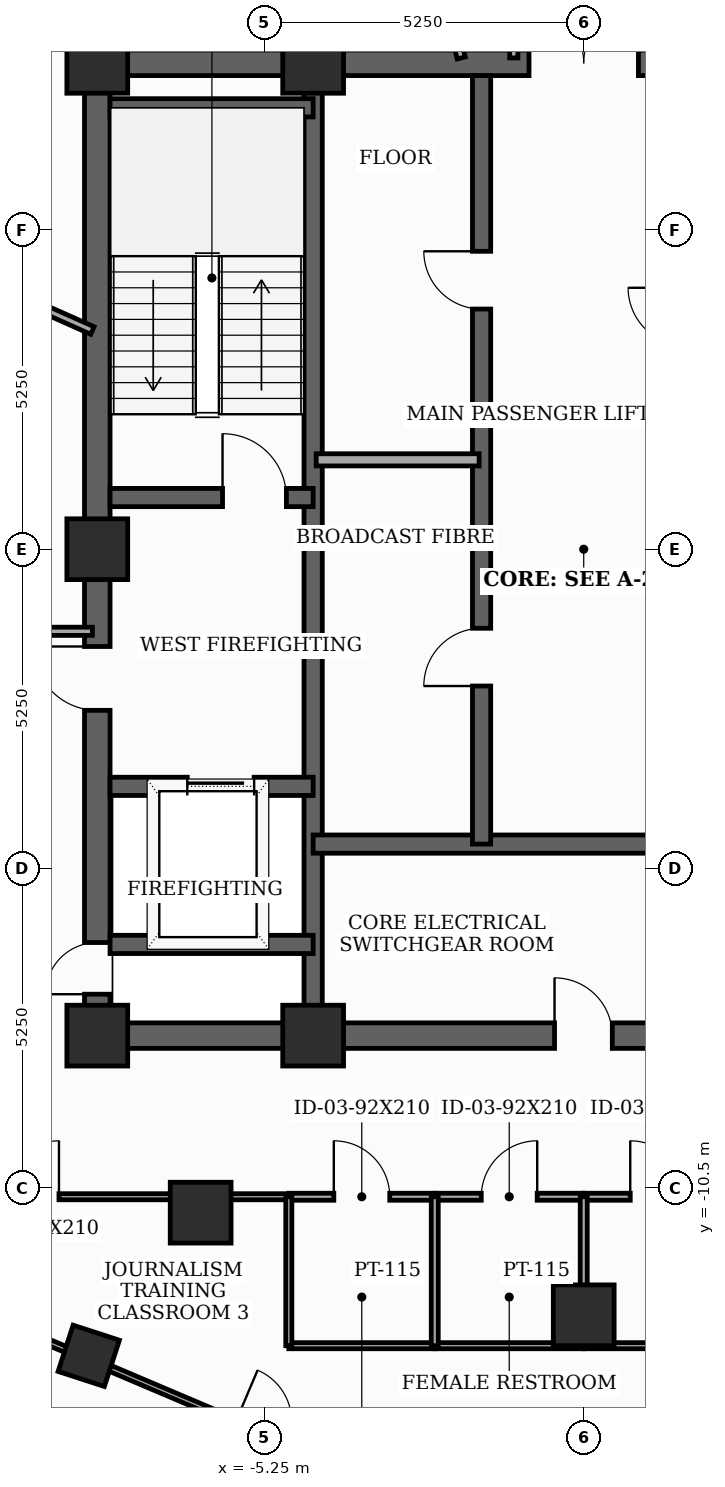
"""IFC4 building model, lengths in metres.
Left out: names, types, materials, properties, quantities, classifications, styles, units other than length and angle.
Written with IfcOpenShell. Run it as: python <this file> out.ifc"""

import sys

from ifc_helpers import new_model, si_unit, direction, frame, frame_2d, origin, origin_2d, place, context, subcontext, project, spatial, rectangle, extrude, element, fill, save


model = new_model("IFC4")
c1 = context("Model", 3, precision=1e-05, world=origin(), true_north=direction((0.0, 1.0)))
c2 = subcontext(c1, "Body", "Model", "MODEL_VIEW")
j1 = project(units=[si_unit("LENGTHUNIT", "METRE"), si_unit("PLANEANGLEUNIT", "RADIAN")], contexts=[c1])
p1 = place(None, origin())
s1 = spatial("IfcSite", under=j1, at=p1, CompositionType="ELEMENT")
p2 = place(p1, origin())
s2 = spatial("IfcBuilding", under=s1, at=p2, CompositionType="ELEMENT")
p3 = place(p2, frame((0.0, 0.0, 286.9)))
s3 = spatial("IfcBuildingStorey", under=s2, at=p3, CompositionType="ELEMENT", Elevation=286.9)
for number, where, z_axis, x_axis in (
    (1, (-8.0, -8.0, 0.0), (0.0, 0.0, 1.0), (1.0, 0.0, 0.0)),
    (2, (-4.45, -8.0, 0.0), (0.0, 0.0, 1.0), (1.0, 0.0, 0.0)),
    (3, (-4.45, 8.0, 0.0), (0.0, 0.0, 1.0), (1.0, 0.0, 0.0)),
    (4, (-8.0, 8.0, 0.0), (0.0, 0.0, 1.0), (1.0, 0.0, 0.0)),
    (5, (-8.0, 0.0, 0.0), (0.0, 0.0, 1.0), (1.0, 0.0, 0.0)),
    (6, (-6.3, -10.912, 0.0), (0.0, 0.0, 1.0), (1.0, 0.0, 0.0)),
    (7, (0.0, -12.6, 0.0), (0.0, 0.0, 1.0), (1.0, 0.0, 0.0)),
):
    element("IfcColumn", number, at=place(p3, frame(where, z_axis=z_axis, x_axis=x_axis)), inside=s3, PredefinedType="COLUMN", context=c2, shape_type="SweptSolid", body=[
        extrude(rectangle(XDim=1.0, YDim=1.0, at=origin_2d()), origin(), (0.0, 0.0, 1.0), 3.7),
    ])
p4 = place(p3, frame((-8.14, -13.266, 0.0), z_axis=(0.0, 0.0, 1.0), x_axis=(0.309016994375, 0.951056516295, 0.0)))
e8 = element("IfcColumn", 8, at=p4, inside=s3, PredefinedType="COLUMN", context=c2, shape_type="SweptSolid", body=[
    extrude(rectangle(XDim=0.8, YDim=0.8, at=origin_2d()), origin(), (0.0, 0.0, 1.0), 3.7),
])
p5 = place(p3, frame((-8.0, -8.0, 0.0), z_axis=(0.0, 0.0, 1.0), x_axis=(0.0, 1.0, 0.0)))
e9 = element("IfcWall", 9, at=p5, inside=s3, PredefinedType="SHEAR", context=c2, shape_type="SweptSolid", body=[
    extrude(rectangle(XDim=16.0, YDim=0.42, at=frame_2d((8.0, 0.0))), origin(), (0.0, 0.0, 1.0), 3.5),
])
p6 = place(p5, frame((0.681, 0.0, 0.0)))
e10 = element("IfcOpeningElement", 10, at=p6, cuts=e9, PredefinedType="OPENING", context=c2, shape_type="SweptSolid", body=[
    extrude(rectangle(XDim=0.85, YDim=2.02, at=frame_2d((0.425, 1.01))), frame((0.0, 0.22, 0.0), z_axis=(0.0, -1.0, 0.0), x_axis=(1.0, 0.0, 0.0)), (0.0, 0.0, 1.0), 0.44),
])
p7 = place(p5, frame((5.35, 0.0, 0.0)))
e11 = element("IfcOpeningElement", 11, at=p7, cuts=e9, PredefinedType="OPENING", context=c2, shape_type="SweptSolid", body=[
    extrude(rectangle(XDim=1.05, YDim=2.15, at=frame_2d((0.525, 1.075))), frame((0.0, 0.22, 0.0), z_axis=(0.0, -1.0, 0.0), x_axis=(1.0, 0.0, 0.0)), (0.0, 0.0, 1.0), 0.44),
])
p8 = place(p3, frame((-8.0, -8.0, 0.0), z_axis=(0.0, 0.0, 1.0), x_axis=(1.0, 0.0, 0.0)))
e12 = element("IfcWall", 12, at=p8, inside=s3, PredefinedType="SHEAR", context=c2, shape_type="SweptSolid", body=[
    extrude(rectangle(XDim=16.0, YDim=0.42, at=frame_2d((8.0, 0.0))), origin(), (0.0, 0.0, 1.0), 3.5),
])
p9 = place(p8, frame((7.52, 0.0, 0.0)))
e13 = element("IfcOpeningElement", 13, at=p9, cuts=e12, PredefinedType="OPENING", context=c2, shape_type="SweptSolid", body=[
    extrude(rectangle(XDim=0.95, YDim=2.1, at=frame_2d((0.475, 1.05))), frame((0.0, 0.22, 0.0), z_axis=(0.0, -1.0, 0.0), x_axis=(1.0, 0.0, 0.0)), (0.0, 0.0, 1.0), 0.44),
])
p10 = place(p3, frame((-8.0, 8.0, 0.0), z_axis=(0.0, 0.0, 1.0), x_axis=(1.0, 0.0, 0.0)))
e14 = element("IfcWall", 14, at=p10, inside=s3, PredefinedType="SHEAR", context=c2, shape_type="SweptSolid", body=[
    extrude(rectangle(XDim=16.0, YDim=0.42, at=frame_2d((8.0, 0.0))), origin(), (0.0, 0.0, 1.0), 3.5),
])
p11 = place(p10, frame((7.1, 0.0, 0.0)))
e15 = element("IfcOpeningElement", 15, at=p11, cuts=e14, PredefinedType="OPENING", context=c2, shape_type="SweptSolid", body=[
    extrude(rectangle(XDim=1.8, YDim=2.15, at=frame_2d((0.9, 1.075))), frame((0.0, 0.22, 0.0), z_axis=(0.0, -1.0, 0.0), x_axis=(1.0, 0.0, 0.0)), (0.0, 0.0, 1.0), 0.44),
])
p12 = place(p3, frame((-4.45, -7.79, 0.0), z_axis=(0.0, 0.0, 1.0), x_axis=(0.0, 1.0, 0.0)))
e16 = element("IfcWall", 16, at=p12, inside=s3, PredefinedType="SHEAR", context=c2, shape_type="SweptSolid", body=[
    extrude(rectangle(XDim=15.58, YDim=0.3, at=frame_2d((7.79, 0.0))), origin(), (0.0, 0.0, 1.0), 3.5),
])
p13 = place(p3, frame((-7.79, 0.85, 0.0), z_axis=(0.0, 0.0, 1.0), x_axis=(1.0, 0.0, 0.0)))
e17 = element("IfcWall", 17, at=p13, inside=s3, PredefinedType="SHEAR", context=c2, shape_type="SweptSolid", body=[
    extrude(rectangle(XDim=3.34, YDim=0.3, at=frame_2d((1.67, 0.0))), origin(), (0.0, 0.0, 1.0), 3.5),
])
p14 = place(p13, frame((1.85, 0.0, 0.0)))
e18 = element("IfcOpeningElement", 18, at=p14, cuts=e17, PredefinedType="OPENING", context=c2, shape_type="SweptSolid", body=[
    extrude(rectangle(XDim=1.05, YDim=2.15, at=frame_2d((0.525, 1.075))), frame((0.0, 0.16, 0.0), z_axis=(0.0, -1.0, 0.0), x_axis=(1.0, 0.0, 0.0)), (0.0, 0.0, 1.0), 0.32),
])
p15 = place(p3, frame((-7.79, 7.26, 0.0), z_axis=(0.0, 0.0, 1.0), x_axis=(1.0, 0.0, 0.0)))
e19 = element("IfcWall", 19, at=p15, inside=s3, PredefinedType="SHEAR", context=c2, shape_type="SweptSolid", body=[
    extrude(rectangle(XDim=3.34, YDim=0.3, at=frame_2d((1.67, 0.0))), origin(), (0.0, 0.0, 1.0), 3.5),
])
p16 = place(p3, frame((-7.79, -3.9, 0.0), z_axis=(0.0, 0.0, 1.0), x_axis=(1.0, 0.0, 0.0)))
e20 = element("IfcWall", 20, at=p16, inside=s3, PredefinedType="SHEAR", context=c2, shape_type="SweptSolid", body=[
    extrude(rectangle(XDim=3.34, YDim=0.3, at=frame_2d((1.67, 0.0))), origin(), (0.0, 0.0, 1.0), 3.5),
])
p17 = place(p16, frame((1.27, 0.0, 0.0)))
e21 = element("IfcOpeningElement", 21, at=p17, cuts=e20, PredefinedType="OPENING", context=c2, shape_type="SweptSolid", body=[
    extrude(rectangle(XDim=1.1, YDim=2.1, at=frame_2d((0.55, 1.05))), frame((0.0, 0.16, 0.0), z_axis=(0.0, -1.0, 0.0), x_axis=(1.0, 0.0, 0.0)), (0.0, 0.0, 1.0), 0.32),
])
p18 = place(p3, frame((-7.79, -6.5, 0.0), z_axis=(0.0, 0.0, 1.0), x_axis=(1.0, 0.0, 0.0)))
e22 = element("IfcWall", 22, at=p18, inside=s3, PredefinedType="SHEAR", context=c2, shape_type="SweptSolid", body=[
    extrude(rectangle(XDim=3.34, YDim=0.3, at=frame_2d((1.67, 0.0))), origin(), (0.0, 0.0, 1.0), 3.5),
])
p19 = place(p3, frame((-4.45, -4.85, 0.0), z_axis=(0.0, 0.0, 1.0), x_axis=(1.0, 0.0, 0.0)))
e23 = element("IfcWall", 23, at=p19, inside=s3, PredefinedType="SHEAR", context=c2, shape_type="SweptSolid", body=[
    extrude(rectangle(XDim=8.9, YDim=0.3, at=frame_2d((4.45, 0.0))), origin(), (0.0, 0.0, 1.0), 3.5),
])
p20 = place(p3, frame((-1.68, -4.85, 0.0), z_axis=(0.0, 0.0, 1.0), x_axis=(0.0, 1.0, 0.0)))
e24 = element("IfcWall", 24, at=p20, inside=s3, PredefinedType="SHEAR", context=c2, shape_type="SweptSolid", body=[
    extrude(rectangle(XDim=12.64, YDim=0.3, at=frame_2d((6.32, 0.0))), origin(), (0.0, 0.0, 1.0), 3.5),
])
p21 = place(p20, frame((2.6, 0.0, 0.0)))
e25 = element("IfcOpeningElement", 25, at=p21, cuts=e24, PredefinedType="OPENING", context=c2, shape_type="SweptSolid", body=[
    extrude(rectangle(XDim=0.95, YDim=2.1, at=frame_2d((0.475, 1.05))), frame((0.0, 0.16, 0.0), z_axis=(0.0, -1.0, 0.0), x_axis=(1.0, 0.0, 0.0)), (0.0, 0.0, 1.0), 0.32),
])
p22 = place(p20, frame((8.8, 0.0, 0.0)))
e26 = element("IfcOpeningElement", 26, at=p22, cuts=e24, PredefinedType="OPENING", context=c2, shape_type="SweptSolid", body=[
    extrude(rectangle(XDim=0.95, YDim=2.1, at=frame_2d((0.475, 1.05))), frame((0.0, 0.16, 0.0), z_axis=(0.0, -1.0, 0.0), x_axis=(1.0, 0.0, 0.0)), (0.0, 0.0, 1.0), 0.32),
])
p23 = place(p3, frame((-4.4, 1.47, 0.0), z_axis=(0.0, 0.0, 1.0), x_axis=(1.0, 0.0, 0.0)))
e27 = element("IfcWall", 27, at=p23, inside=s3, PredefinedType="SOLIDWALL", context=c2, shape_type="SweptSolid", body=[
    extrude(rectangle(XDim=2.68, YDim=0.2, at=frame_2d((1.34, 0.0))), origin(), (0.0, 0.0, 1.0), 3.5),
])
p24 = place(p3, frame((-8.08, -1.35, 0.0), z_axis=(0.0, 0.0, 1.0), x_axis=(-1.0, 0.0, 0.0)))
e28 = element("IfcWall", 28, at=p24, inside=s3, PredefinedType="PARTITIONING", context=c2, shape_type="SweptSolid", body=[
    extrude(rectangle(XDim=2.57, YDim=0.135, at=frame_2d((1.285, 0.0))), origin(), (0.0, 0.0, 1.0), 2.885),
])
p25 = place(p3, frame((-10.15, -10.65, 0.0), z_axis=(0.0, 0.0, 1.0), x_axis=(1.0, 0.0, 0.0)))
e29 = element("IfcWall", 29, at=p25, inside=s3, PredefinedType="MOVABLE", context=c2, shape_type="SweptSolid", body=[
    extrude(rectangle(XDim=5.3, YDim=0.1, at=frame_2d((2.65, 0.0))), origin(), (0.0, 0.0, 1.0), 2.885),
])
p26 = place(p25, frame((0.6, 0.0, 0.0)))
e30 = element("IfcOpeningElement", 30, at=p26, cuts=e29, PredefinedType="OPENING", context=c2, shape_type="SweptSolid", body=[
    extrude(rectangle(XDim=0.92, YDim=2.1, at=frame_2d((0.46, 1.05))), frame((0.0, 0.06, 0.0), z_axis=(0.0, -1.0, 0.0), x_axis=(1.0, 0.0, 0.0)), (0.0, 0.0, 1.0), 0.12),
])
p27 = place(p3, frame((-4.85, -10.65, 0.0), z_axis=(0.0, 0.0, 1.0), x_axis=(1.0, 0.0, 0.0)))
e31 = element("IfcWall", 31, at=p27, inside=s3, PredefinedType="PARTITIONING", context=c2, shape_type="SweptSolid", body=[
    extrude(rectangle(XDim=2.4, YDim=0.115, at=frame_2d((1.2, 0.0))), origin(), (0.0, 0.0, 1.0), 3.5),
])
p28 = place(p27, frame((0.74, 0.0, 0.0)))
e32 = element("IfcOpeningElement", 32, at=p28, cuts=e31, PredefinedType="OPENING", context=c2, shape_type="SweptSolid", body=[
    extrude(rectangle(XDim=0.92, YDim=2.1, at=frame_2d((0.46, 1.05))), frame((0.0, 0.067, 0.0), z_axis=(0.0, -1.0, 0.0), x_axis=(1.0, 0.0, 0.0)), (0.0, 0.0, 1.0), 0.135),
])
p29 = place(p3, frame((-2.45, -10.65, 0.0), z_axis=(0.0, 0.0, 1.0), x_axis=(1.0, 0.0, 0.0)))
e33 = element("IfcWall", 33, at=p29, inside=s3, PredefinedType="PARTITIONING", context=c2, shape_type="SweptSolid", body=[
    extrude(rectangle(XDim=2.45, YDim=0.115, at=frame_2d((1.225, 0.0))), origin(), (0.0, 0.0, 1.0), 2.885),
])
p30 = place(p29, frame((0.765, 0.0, 0.0)))
e34 = element("IfcOpeningElement", 34, at=p30, cuts=e33, PredefinedType="OPENING", context=c2, shape_type="SweptSolid", body=[
    extrude(rectangle(XDim=0.92, YDim=2.1, at=frame_2d((0.46, 1.05))), frame((0.0, 0.067, 0.0), z_axis=(0.0, -1.0, 0.0), x_axis=(1.0, 0.0, 0.0)), (0.0, 0.0, 1.0), 0.135),
])
p31 = place(p3, frame((0.0, -10.65, 0.0), z_axis=(0.0, 0.0, 1.0), x_axis=(1.0, 0.0, 0.0)))
e35 = element("IfcWall", 35, at=p31, inside=s3, PredefinedType="PARTITIONING", context=c2, shape_type="SweptSolid", body=[
    extrude(rectangle(XDim=2.45, YDim=0.115, at=frame_2d((1.225, 0.0))), origin(), (0.0, 0.0, 1.0), 3.5),
])
p32 = place(p31, frame((0.765, 0.0, 0.0)))
e36 = element("IfcOpeningElement", 36, at=p32, cuts=e35, PredefinedType="OPENING", context=c2, shape_type="SweptSolid", body=[
    extrude(rectangle(XDim=0.92, YDim=2.1, at=frame_2d((0.46, 1.05))), frame((0.0, 0.067, 0.0), z_axis=(0.0, -1.0, 0.0), x_axis=(1.0, 0.0, 0.0)), (0.0, 0.0, 1.0), 0.135),
])
p33 = place(p3, frame((-1.15, 10.65, 0.0), z_axis=(0.0, 0.0, 1.0), x_axis=(0.0, -1.0, 0.0)))
e37 = element("IfcWall", 37, at=p33, inside=s3, PredefinedType="PARTITIONING", context=c2, shape_type="SweptSolid", body=[
    extrude(rectangle(XDim=2.57, YDim=0.135, at=frame_2d((1.285, 0.0))), origin(), (0.0, 0.0, 1.0), 2.885),
])
p34 = place(p3, frame((-8.08, 3.597, 0.0), z_axis=(0.0, 0.0, 1.0), x_axis=(-0.913542590258, 0.406743083266, 0.0)))
e38 = element("IfcWall", 38, at=p34, inside=s3, PredefinedType="PARTITIONING", context=c2, shape_type="SweptSolid", body=[
    extrude(rectangle(XDim=18.505, YDim=0.135, at=frame_2d((9.252, 0.0))), origin(), (0.0, 0.0, 1.0), 2.885),
])
p35 = place(p34, frame((8.792, 0.0, 0.0)))
e39 = element("IfcOpeningElement", 39, at=p35, cuts=e38, PredefinedType="OPENING", context=c2, shape_type="SweptSolid", body=[
    extrude(rectangle(XDim=0.92, YDim=2.1, at=frame_2d((0.46, 1.05))), frame((0.0, 0.077, 0.0), z_axis=(0.0, -1.0, 0.0), x_axis=(1.0, 0.0, 0.0)), (0.0, 0.0, 1.0), 0.155),
])
p36 = place(p3, frame((-2.45, -13.1, 0.0), z_axis=(0.0, 0.0, 1.0), x_axis=(-1.0, 0.0, 0.0)))
e40 = element("IfcWall", 40, at=p36, inside=s3, PredefinedType="MOVABLE", context=c2, shape_type="SweptSolid", body=[
    extrude(rectangle(XDim=2.4, YDim=0.1, at=frame_2d((1.2, 0.0))), origin(), (0.0, 0.0, 1.0), 3.5),
])
p37 = place(p3, frame((-4.85, -13.1, 0.0), z_axis=(0.0, 0.0, 1.0), x_axis=(0.0, 1.0, 0.0)))
e41 = element("IfcWall", 41, at=p37, inside=s3, PredefinedType="MOVABLE", context=c2, shape_type="SweptSolid", body=[
    extrude(rectangle(XDim=2.45, YDim=0.1, at=frame_2d((1.225, 0.0))), origin(), (0.0, 0.0, 1.0), 2.885),
])
p38 = place(p3, frame((0.0, -13.1, 0.0), z_axis=(0.0, 0.0, 1.0), x_axis=(-1.0, 0.0, 0.0)))
e42 = element("IfcWall", 42, at=p38, inside=s3, PredefinedType="MOVABLE", context=c2, shape_type="SweptSolid", body=[
    extrude(rectangle(XDim=2.45, YDim=0.1, at=frame_2d((1.225, 0.0))), origin(), (0.0, 0.0, 1.0), 3.035),
])
p39 = place(p3, frame((-9.1, -12.916, 0.0), z_axis=(0.0, 0.0, 1.0), x_axis=(0.920506675175, -0.390726836752, 0.0)))
e43 = element("IfcWall", 43, at=p39, inside=s3, PredefinedType="MOVABLE", context=c2, shape_type="SweptSolid", body=[
    extrude(rectangle(XDim=6.659, YDim=0.1, at=frame_2d((3.33, 0.0))), origin(), (0.0, 0.0, 1.0), 3.035),
])
p40 = place(p39, frame((3.669, 0.0, 0.0)))
e44 = element("IfcOpeningElement", 44, at=p40, cuts=e43, PredefinedType="OPENING", context=c2, shape_type="SweptSolid", body=[
    extrude(rectangle(XDim=0.92, YDim=2.1, at=frame_2d((0.46, 1.05))), frame((0.0, 0.06, 0.0), z_axis=(0.0, -1.0, 0.0), x_axis=(1.0, 0.0, 0.0)), (0.0, 0.0, 1.0), 0.12),
])
p41 = place(p3, frame((2.45, -13.1, 0.0), z_axis=(0.0, 0.0, 1.0), x_axis=(-1.0, 0.0, 0.0)))
e45 = element("IfcWall", 45, at=p41, inside=s3, PredefinedType="MOVABLE", context=c2, shape_type="SweptSolid", body=[
    extrude(rectangle(XDim=2.45, YDim=0.1, at=frame_2d((1.225, 0.0))), origin(), (0.0, 0.0, 1.0), 3.035),
])
for number, where, z_axis, x_axis in (
    (46, (-2.45, -13.1, 0.0), (0.0, 0.0, 1.0), (0.0, 1.0, 0.0)),
    (47, (0.0, -13.1, 0.0), (0.0, 0.0, 1.0), (0.0, 1.0, 0.0)),
):
    element("IfcWall", number, at=place(p3, frame(where, z_axis=z_axis, x_axis=x_axis)), inside=s3, PredefinedType="PARTITIONING", context=c2, shape_type="SweptSolid", body=[
        extrude(rectangle(XDim=2.45, YDim=0.115, at=frame_2d((1.225, 0.0))), origin(), (0.0, 0.0, 1.0), 2.885),
    ])
p42 = place(p3, frame((-3.803, 15.255, 0.0), z_axis=(0.0, 0.0, 1.0), x_axis=(0.241851911951, -0.970313172479, 0.0)))
e48 = element("IfcWall", 48, at=p42, inside=s3, PredefinedType="PARTITIONING", context=c2, shape_type="SweptSolid", body=[
    extrude(rectangle(XDim=7.394, YDim=0.135, at=frame_2d((3.697, 0.0))), origin(), (0.0, 0.0, 1.0), 2.885),
])
p43 = place(p6, origin())
e49 = element("IfcDoor", 49, at=p43, inside=s3, OperationType="SINGLE_SWING_LEFT", PredefinedType="TRAPDOOR", context=c2, shape_type="SweptSolid", body=[
    extrude(rectangle(XDim=0.85, YDim=2.02, at=frame_2d((0.425, 1.01))), frame((0.0, 0.025, 0.0), z_axis=(0.0, -1.0, 0.0), x_axis=(1.0, 0.0, 0.0)), (0.0, 0.0, 1.0), 0.05),
])
fill(e10, e49)
p44 = place(p7, origin())
e50 = element("IfcDoor", 50, at=p44, inside=s3, OperationType="SINGLE_SWING_RIGHT", PredefinedType="DOOR", context=c2, shape_type="SweptSolid", body=[
    extrude(rectangle(XDim=1.05, YDim=2.15, at=frame_2d((0.525, 1.075))), frame((0.0, 0.025, 0.0), z_axis=(0.0, -1.0, 0.0), x_axis=(1.0, 0.0, 0.0)), (0.0, 0.0, 1.0), 0.05),
])
fill(e11, e50)
p45 = place(p9, origin())
e51 = element("IfcDoor", 51, at=p45, inside=s3, OperationType="SINGLE_SWING_LEFT", PredefinedType="DOOR", context=c2, shape_type="SweptSolid", body=[
    extrude(rectangle(XDim=0.95, YDim=2.1, at=frame_2d((0.475, 1.05))), frame((0.0, 0.025, 0.0), z_axis=(0.0, -1.0, 0.0), x_axis=(1.0, 0.0, 0.0)), (0.0, 0.0, 1.0), 0.05),
])
fill(e13, e51)
p46 = place(p11, origin())
e52 = element("IfcDoor", 52, at=p46, inside=s3, OperationType="DOUBLE_DOOR_SINGLE_SWING", PredefinedType="DOOR", context=c2, shape_type="SweptSolid", body=[
    extrude(rectangle(XDim=1.8, YDim=2.15, at=frame_2d((0.9, 1.075))), frame((0.0, 0.025, 0.0), z_axis=(0.0, -1.0, 0.0), x_axis=(1.0, 0.0, 0.0)), (0.0, 0.0, 1.0), 0.05),
])
fill(e15, e52)
p47 = place(p14, origin())
e53 = element("IfcDoor", 53, at=p47, inside=s3, OperationType="SINGLE_SWING_LEFT", PredefinedType="DOOR", context=c2, shape_type="SweptSolid", body=[
    extrude(rectangle(XDim=1.05, YDim=2.15, at=frame_2d((0.525, 1.075))), frame((0.0, 0.025, 0.0), z_axis=(0.0, -1.0, 0.0), x_axis=(1.0, 0.0, 0.0)), (0.0, 0.0, 1.0), 0.05),
])
fill(e18, e53)
p48 = place(p17, origin())
e54 = element("IfcDoor", 54, at=p48, inside=s3, OperationType="SLIDING_TO_LEFT", PredefinedType="DOOR", context=c2, shape_type="SweptSolid", body=[
    extrude(rectangle(XDim=1.1, YDim=2.1, at=frame_2d((0.55, 1.05))), frame((0.0, 0.025, 0.0), z_axis=(0.0, -1.0, 0.0), x_axis=(1.0, 0.0, 0.0)), (0.0, 0.0, 1.0), 0.05),
])
fill(e21, e54)
p49 = place(p21, origin())
e55 = element("IfcDoor", 55, at=p49, inside=s3, OperationType="SINGLE_SWING_LEFT", PredefinedType="DOOR", context=c2, shape_type="SweptSolid", body=[
    extrude(rectangle(XDim=0.95, YDim=2.1, at=frame_2d((0.475, 1.05))), frame((0.0, 0.025, 0.0), z_axis=(0.0, -1.0, 0.0), x_axis=(1.0, 0.0, 0.0)), (0.0, 0.0, 1.0), 0.05),
])
fill(e25, e55)
p50 = place(p22, origin())
e56 = element("IfcDoor", 56, at=p50, inside=s3, OperationType="SINGLE_SWING_RIGHT", PredefinedType="DOOR", context=c2, shape_type="SweptSolid", body=[
    extrude(rectangle(XDim=0.95, YDim=2.1, at=frame_2d((0.475, 1.05))), frame((0.0, 0.025, 0.0), z_axis=(0.0, -1.0, 0.0), x_axis=(1.0, 0.0, 0.0)), (0.0, 0.0, 1.0), 0.05),
])
fill(e26, e56)
p51 = place(p26, origin())
e57 = element("IfcDoor", 57, at=p51, inside=s3, OperationType="SINGLE_SWING_RIGHT", PredefinedType="DOOR", context=c2, shape_type="SweptSolid", body=[
    extrude(rectangle(XDim=0.92, YDim=2.1, at=frame_2d((0.46, 1.05))), frame((0.0, 0.025, 0.0), z_axis=(0.0, -1.0, 0.0), x_axis=(1.0, 0.0, 0.0)), (0.0, 0.0, 1.0), 0.05),
])
fill(e30, e57)
p52 = place(p28, origin())
e58 = element("IfcDoor", 58, at=p52, inside=s3, OperationType="SINGLE_SWING_LEFT", PredefinedType="DOOR", context=c2, shape_type="SweptSolid", body=[
    extrude(rectangle(XDim=0.92, YDim=2.1, at=frame_2d((0.46, 1.05))), frame((0.0, 0.025, 0.0), z_axis=(0.0, -1.0, 0.0), x_axis=(1.0, 0.0, 0.0)), (0.0, 0.0, 1.0), 0.05),
])
fill(e32, e58)
p53 = place(p30, origin())
e59 = element("IfcDoor", 59, at=p53, inside=s3, OperationType="SINGLE_SWING_RIGHT", PredefinedType="DOOR", context=c2, shape_type="SweptSolid", body=[
    extrude(rectangle(XDim=0.92, YDim=2.1, at=frame_2d((0.46, 1.05))), frame((0.0, 0.025, 0.0), z_axis=(0.0, -1.0, 0.0), x_axis=(1.0, 0.0, 0.0)), (0.0, 0.0, 1.0), 0.05),
])
fill(e34, e59)
p54 = place(p32, origin())
e60 = element("IfcDoor", 60, at=p54, inside=s3, OperationType="SINGLE_SWING_LEFT", PredefinedType="DOOR", context=c2, shape_type="SweptSolid", body=[
    extrude(rectangle(XDim=0.92, YDim=2.1, at=frame_2d((0.46, 1.05))), frame((0.0, 0.025, 0.0), z_axis=(0.0, -1.0, 0.0), x_axis=(1.0, 0.0, 0.0)), (0.0, 0.0, 1.0), 0.05),
])
fill(e36, e60)
save(model, sys.argv[1])
